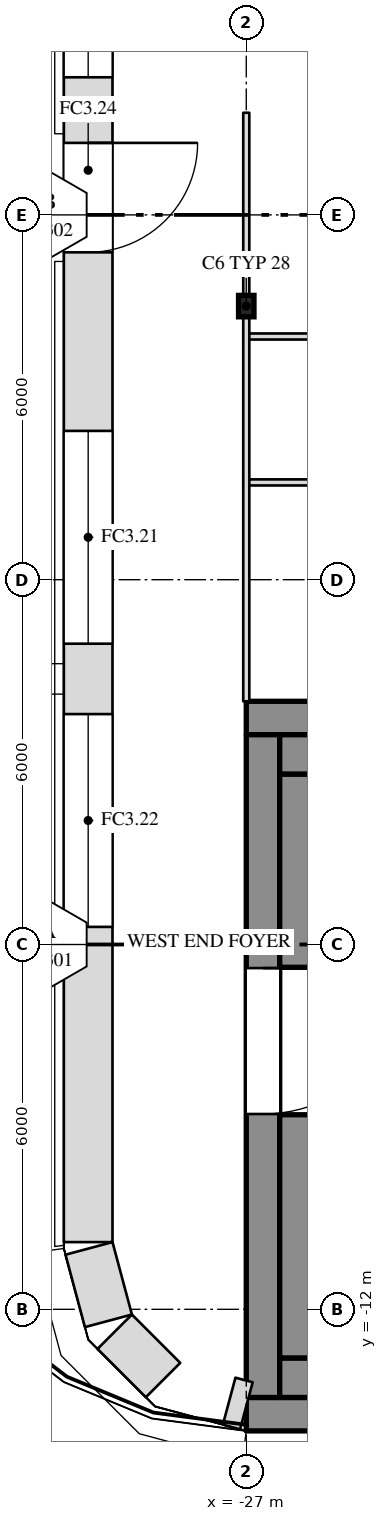
"""IFC4 building model, lengths in metres.
Left out: names, types, materials, properties, quantities, classifications, styles, units other than length and angle.
Written with IfcOpenShell. Run it as: python <this file> out.ifc"""

import sys

from ifc_helpers import new_model, si_unit, direction, frame, frame_2d, origin, origin_2d, place, context, subcontext, project, spatial, rectangle, i_section, extrude, element, fill, save


model = new_model("IFC4")
c1 = context("Model", 3, precision=1e-05, world=origin(), true_north=direction((0.0, 1.0)))
c2 = subcontext(c1, "Body", "Model", "MODEL_VIEW")
j1 = project(units=[si_unit("LENGTHUNIT", "METRE"), si_unit("PLANEANGLEUNIT", "RADIAN")], contexts=[c1])
p1 = place(None, origin())
s1 = spatial("IfcSite", under=j1, at=p1, CompositionType="ELEMENT")
p2 = place(p1, origin())
s2 = spatial("IfcBuilding", under=s1, at=p2, CompositionType="ELEMENT")
p3 = place(p2, frame((0.0, 0.0, 292.5)))
s3 = spatial("IfcBuildingStorey", under=s2, at=p3, CompositionType="ELEMENT", Elevation=292.5)
p4 = place(p3, frame((-27.0, 4.5, 0.0), z_axis=(0.0, 0.0, 1.0), x_axis=(1.0, 0.0, 0.0)))
e1 = element("IfcColumn", 1, at=p4, inside=s3, PredefinedType="COLUMN", context=c2, shape_type="SweptSolid", body=[
    extrude(i_section(OverallWidth=0.254, OverallDepth=0.353, WebThickness=0.01, FlangeThickness=0.016, at=origin_2d()), origin(), (0.0, 0.0, 1.0), 4.0),
])
p5 = place(p3, frame((-27.0, -2.275, 0.0), z_axis=(0.0, 0.0, 1.0), x_axis=(1.0, 0.0, 0.0)))
e2 = element("IfcWall", 2, at=p5, inside=s3, PredefinedType="SHEAR", context=c2, shape_type="SweptSolid", body=[
    extrude(rectangle(XDim=54.0, YDim=0.55, at=frame_2d((27.0, 0.0))), origin(), (0.0, 0.0, 1.0), 3.6),
])
p6 = place(p5, frame((15.15, 0.0, 0.0)))
e3 = element("IfcOpeningElement", 3, at=p6, cuts=e2, PredefinedType="OPENING", context=c2, shape_type="SweptSolid", body=[
    extrude(rectangle(XDim=2.4, YDim=2.1, at=frame_2d((1.2, 1.05))), frame((0.0, 0.287, 0.0), z_axis=(0.0, -1.0, 0.0), x_axis=(1.0, 0.0, 0.0)), (0.0, 0.0, 1.0), 0.574),
])
p7 = place(p5, frame((36.45, 0.0, 0.0)))
e4 = element("IfcOpeningElement", 4, at=p7, cuts=e2, PredefinedType="OPENING", context=c2, shape_type="SweptSolid", body=[
    extrude(rectangle(XDim=2.4, YDim=2.1, at=frame_2d((1.2, 1.05))), frame((0.0, 0.287, 0.0), z_axis=(0.0, -1.0, 0.0), x_axis=(1.0, 0.0, 0.0)), (0.0, 0.0, 1.0), 0.574),
])
p8 = place(p3, frame((-27.0, -13.725, 0.0), z_axis=(0.0, 0.0, 1.0), x_axis=(1.0, 0.0, 0.0)))
e5 = element("IfcWall", 5, at=p8, inside=s3, PredefinedType="SHEAR", context=c2, shape_type="SweptSolid", body=[
    extrude(rectangle(XDim=54.0, YDim=0.55, at=frame_2d((27.0, 0.0))), origin(), (0.0, 0.0, 1.0), 3.6),
])
p9 = place(p3, frame((-26.725, -13.45, 0.0), z_axis=(0.0, 0.0, 1.0), x_axis=(0.0, 1.0, 0.0)))
e6 = element("IfcWall", 6, at=p9, inside=s3, PredefinedType="SHEAR", context=c2, shape_type="SweptSolid", body=[
    extrude(rectangle(XDim=10.9, YDim=0.55, at=frame_2d((5.45, 0.0))), origin(), (0.0, 0.0, 1.0), 3.6),
])
p10 = place(p9, frame((4.662, 0.0, 0.0)))
e7 = element("IfcOpeningElement", 7, at=p10, cuts=e6, PredefinedType="OPENING", context=c2, shape_type="SweptSolid", body=[
    extrude(rectangle(XDim=2.4, YDim=2.1, at=frame_2d((1.2, 1.05))), frame((0.0, 0.287, 0.0), z_axis=(0.0, -1.0, 0.0), x_axis=(1.0, 0.0, 0.0)), (0.0, 0.0, 1.0), 0.574),
])
p11 = place(p3, frame((-26.45, -2.875, 0.0), z_axis=(0.0, 0.0, 1.0), x_axis=(1.0, 0.0, 0.0)))
e8 = element("IfcWall", 8, at=p11, inside=s3, PredefinedType="SHEAR", context=c2, shape_type="SweptSolid", body=[
    extrude(rectangle(XDim=14.45, YDim=0.65, at=frame_2d((7.225, 0.0))), origin(), (0.0, 0.0, 1.0), 3.6),
])
p12 = place(p3, frame((-26.45, -13.125, 0.0), z_axis=(0.0, 0.0, 1.0), x_axis=(1.0, 0.0, 0.0)))
e9 = element("IfcWall", 9, at=p12, inside=s3, PredefinedType="SHEAR", context=c2, shape_type="SweptSolid", body=[
    extrude(rectangle(XDim=52.9, YDim=0.65, at=frame_2d((26.45, 0.0))), origin(), (0.0, 0.0, 1.0), 3.6),
])
p13 = place(p3, frame((-26.125, -12.8, 0.0), z_axis=(0.0, 0.0, 1.0), x_axis=(0.0, 1.0, 0.0)))
e10 = element("IfcWall", 10, at=p13, inside=s3, PredefinedType="SHEAR", context=c2, shape_type="SweptSolid", body=[
    extrude(rectangle(XDim=4.0, YDim=0.65, at=frame_2d((2.0, 0.0))), origin(), (0.0, 0.0, 1.0), 3.6),
])
p14 = place(p3, frame((-26.125, -6.375, 0.0), z_axis=(0.0, 0.0, 1.0), x_axis=(0.0, 1.0, 0.0)))
e11 = element("IfcWall", 11, at=p14, inside=s3, PredefinedType="SHEAR", context=c2, shape_type="SweptSolid", body=[
    extrude(rectangle(XDim=3.175, YDim=0.65, at=frame_2d((1.587, 0.0))), origin(), (0.0, 0.0, 1.0), 3.6),
])
p15 = place(p3, frame((-27.0, -2.0, 0.0), z_axis=(0.0, 0.0, 1.0), x_axis=(0.0, 1.0, 0.0)))
e12 = element("IfcWall", 12, at=p15, inside=s3, PredefinedType="PARTITIONING", context=c2, shape_type="SweptSolid", body=[
    extrude(rectangle(XDim=6.323, YDim=0.1, at=frame_2d((3.162, 0.0))), origin(), (0.0, 0.0, 1.0), 2.668),
])
p16 = place(p3, frame((-27.0, 4.677, 0.0), z_axis=(0.0, 0.0, 1.0), x_axis=(0.0, 1.0, 0.0)))
e13 = element("IfcWall", 13, at=p16, inside=s3, PredefinedType="PARTITIONING", context=c2, shape_type="SweptSolid", body=[
    extrude(rectangle(XDim=3.003, YDim=0.1, at=frame_2d((1.502, 0.0))), origin(), (0.0, 0.0, 1.0), 2.668),
])
p17 = place(p3, frame((-26.95, 1.6, 0.0), z_axis=(0.0, 0.0, 1.0), x_axis=(1.0, 0.0, 0.0)))
e14 = element("IfcWall", 14, at=p17, inside=s3, PredefinedType="PARTITIONING", context=c2, shape_type="SweptSolid", body=[
    extrude(rectangle(XDim=13.4, YDim=0.1, at=frame_2d((6.7, 0.0))), origin(), (0.0, 0.0, 1.0), 3.6),
])
p18 = place(p17, frame((2.225, 0.0, 0.0)))
e15 = element("IfcOpeningElement", 15, at=p18, cuts=e14, PredefinedType="OPENING", context=c2, shape_type="SweptSolid", body=[
    extrude(rectangle(XDim=1.0, YDim=2.1, at=frame_2d((0.5, 1.05))), frame((0.0, 0.062, 0.0), z_axis=(0.0, -1.0, 0.0), x_axis=(1.0, 0.0, 0.0)), (0.0, 0.0, 1.0), 0.124),
])
p19 = place(p17, frame((7.775, 0.0, 0.0)))
e16 = element("IfcOpeningElement", 16, at=p19, cuts=e14, PredefinedType="OPENING", context=c2, shape_type="SweptSolid", body=[
    extrude(rectangle(XDim=1.0, YDim=2.1, at=frame_2d((0.5, 1.05))), frame((0.0, 0.062, 0.0), z_axis=(0.0, -1.0, 0.0), x_axis=(1.0, 0.0, 0.0)), (0.0, 0.0, 1.0), 0.124),
])
p20 = place(p17, frame((11.75, 0.0, 0.0)))
e17 = element("IfcOpeningElement", 17, at=p20, cuts=e14, PredefinedType="OPENING", context=c2, shape_type="SweptSolid", body=[
    extrude(rectangle(XDim=1.0, YDim=2.1, at=frame_2d((0.5, 1.05))), frame((0.0, 0.062, 0.0), z_axis=(0.0, -1.0, 0.0), x_axis=(1.0, 0.0, 0.0)), (0.0, 0.0, 1.0), 0.124),
])
p21 = place(p3, frame((-26.95, 4.0, 0.0), z_axis=(0.0, 0.0, 1.0), x_axis=(1.0, 0.0, 0.0)))
e18 = element("IfcWall", 18, at=p21, inside=s3, PredefinedType="PARTITIONING", context=c2, shape_type="SweptSolid", body=[
    extrude(rectangle(XDim=13.5, YDim=0.1, at=frame_2d((6.75, 0.0))), origin(), (0.0, 0.0, 1.0), 3.6),
])
p22 = place(p21, frame((6.2, 0.0, 0.0)))
e19 = element("IfcOpeningElement", 19, at=p22, cuts=e18, PredefinedType="OPENING", context=c2, shape_type="SweptSolid", body=[
    extrude(rectangle(XDim=1.0, YDim=2.1, at=frame_2d((0.5, 1.05))), frame((0.0, 0.062, 0.0), z_axis=(0.0, -1.0, 0.0), x_axis=(1.0, 0.0, 0.0)), (0.0, 0.0, 1.0), 0.124),
])
p23 = place(p3, frame((-29.6, 30.948, 0.0), z_axis=(0.0, 0.0, 1.0), x_axis=(0.0, -1.0, 0.0)))
e20 = element("IfcWall", 20, at=p23, inside=s3, PredefinedType="SOLIDWALL", context=c2, shape_type="SweptSolid", body=[
    extrude(rectangle(XDim=41.842, YDim=0.8, at=frame_2d((20.921, 0.0))), origin(), (0.0, 0.0, 1.0), 3.6),
])
p24 = place(p23, frame((5.211, 0.0, 1.0)))
e21 = element("IfcOpeningElement", 21, at=p24, cuts=e20, PredefinedType="OPENING", context=c2, shape_type="SweptSolid", body=[
    extrude(rectangle(XDim=3.5, YDim=2.3, at=frame_2d((1.75, 1.15))), frame((0.0, 0.412, 0.0), z_axis=(0.0, -1.0, 0.0), x_axis=(1.0, 0.0, 0.0)), (0.0, 0.0, 1.0), 0.824),
])
p25 = place(p23, frame((9.868, 0.0, 1.0)))
e22 = element("IfcOpeningElement", 22, at=p25, cuts=e20, PredefinedType="OPENING", context=c2, shape_type="SweptSolid", body=[
    extrude(rectangle(XDim=3.5, YDim=2.3, at=frame_2d((1.75, 1.15))), frame((0.0, 0.412, 0.0), z_axis=(0.0, -1.0, 0.0), x_axis=(1.0, 0.0, 0.0)), (0.0, 0.0, 1.0), 0.824),
])
p26 = place(p23, frame((14.527, 0.0, 1.0)))
e23 = element("IfcOpeningElement", 23, at=p26, cuts=e20, PredefinedType="OPENING", context=c2, shape_type="SweptSolid", body=[
    extrude(rectangle(XDim=3.5, YDim=2.3, at=frame_2d((1.75, 1.15))), frame((0.0, 0.412, 0.0), z_axis=(0.0, -1.0, 0.0), x_axis=(1.0, 0.0, 0.0)), (0.0, 0.0, 1.0), 0.824),
])
p27 = place(p23, frame((19.184, 0.0, 1.0)))
e24 = element("IfcOpeningElement", 24, at=p27, cuts=e20, PredefinedType="OPENING", context=c2, shape_type="SweptSolid", body=[
    extrude(rectangle(XDim=3.5, YDim=2.3, at=frame_2d((1.75, 1.15))), frame((0.0, 0.412, 0.0), z_axis=(0.0, -1.0, 0.0), x_axis=(1.0, 0.0, 0.0)), (0.0, 0.0, 1.0), 0.824),
])
p28 = place(p23, frame((28.5, 0.0, 1.0)))
e25 = element("IfcOpeningElement", 25, at=p28, cuts=e20, PredefinedType="OPENING", context=c2, shape_type="SweptSolid", body=[
    extrude(rectangle(XDim=3.5, YDim=2.3, at=frame_2d((1.75, 1.15))), frame((0.0, 0.412, 0.0), z_axis=(0.0, -1.0, 0.0), x_axis=(1.0, 0.0, 0.0)), (0.0, 0.0, 1.0), 0.824),
])
p29 = place(p23, frame((33.158, 0.0, 1.0)))
e26 = element("IfcOpeningElement", 26, at=p29, cuts=e20, PredefinedType="OPENING", context=c2, shape_type="SweptSolid", body=[
    extrude(rectangle(XDim=3.5, YDim=2.3, at=frame_2d((1.75, 1.15))), frame((0.0, 0.412, 0.0), z_axis=(0.0, -1.0, 0.0), x_axis=(1.0, 0.0, 0.0)), (0.0, 0.0, 1.0), 0.824),
])
p30 = place(p23, frame((23.763, 0.0, 0.0)))
e27 = element("IfcOpeningElement", 27, at=p30, cuts=e20, PredefinedType="OPENING", context=c2, shape_type="SweptSolid", body=[
    extrude(rectangle(XDim=1.8, YDim=2.4, at=frame_2d((0.9, 1.2))), frame((0.0, 0.412, 0.0), z_axis=(0.0, -1.0, 0.0), x_axis=(1.0, 0.0, 0.0)), (0.0, 0.0, 1.0), 0.824),
])
p31 = place(p3, frame((-29.586, -10.998, 0.0), z_axis=(0.0, 0.0, 1.0), x_axis=(0.258943885187, -0.965892366842, 0.0)))
e28 = element("IfcWall", 28, at=p31, inside=s3, PredefinedType="SOLIDWALL", context=c2, shape_type="SweptSolid", body=[
    extrude(rectangle(XDim=1.233, YDim=0.8, at=frame_2d((0.617, 0.0))), origin(), (0.0, 0.0, 1.0), 3.6),
])
p32 = place(p3, frame((-29.164, -12.369, 0.0), z_axis=(0.0, 0.0, 1.0), x_axis=(0.707106781187, -0.707106781187, 0.0)))
e29 = element("IfcWall", 29, at=p32, inside=s3, PredefinedType="SOLIDWALL", context=c2, shape_type="SweptSolid", body=[
    extrude(rectangle(XDim=1.125, YDim=0.8, at=frame_2d((0.562, 0.0))), origin(), (0.0, 0.0, 1.0), 3.6),
])
p33 = place(p3, frame((-27.281, -13.51, 0.0), z_axis=(0.0, 0.0, 1.0), x_axis=(0.965888567797, -0.258958055677, 0.0)))
e30 = element("IfcWall", 30, at=p33, inside=s3, PredefinedType="SOLIDWALL", context=c2, shape_type="SweptSolid", body=[
    extrude(rectangle(XDim=0.293, YDim=0.8, at=frame_2d((0.146, 0.0))), origin(), (0.0, 0.0, 1.0), 3.6),
])
p34 = place(p27, origin())
e31 = element("IfcWindow", 31, at=p34, inside=s3, PartitioningType="SINGLE_PANEL", PredefinedType="WINDOW", context=c2, shape_type="SweptSolid", body=[
    extrude(rectangle(XDim=3.5, YDim=2.3, at=frame_2d((1.75, 1.15))), frame((0.0, 0.03, 0.0), z_axis=(0.0, -1.0, 0.0), x_axis=(1.0, 0.0, 0.0)), (0.0, 0.0, 1.0), 0.06),
])
fill(e24, e31)
p35 = place(p28, origin())
e32 = element("IfcWindow", 32, at=p35, inside=s3, PartitioningType="SINGLE_PANEL", PredefinedType="WINDOW", context=c2, shape_type="SweptSolid", body=[
    extrude(rectangle(XDim=3.5, YDim=2.3, at=frame_2d((1.75, 1.15))), frame((0.0, 0.03, 0.0), z_axis=(0.0, -1.0, 0.0), x_axis=(1.0, 0.0, 0.0)), (0.0, 0.0, 1.0), 0.06),
])
fill(e25, e32)
p36 = place(p29, origin())
e33 = element("IfcWindow", 33, at=p36, inside=s3, PartitioningType="SINGLE_PANEL", PredefinedType="WINDOW", context=c2, shape_type="SweptSolid", body=[
    extrude(rectangle(XDim=3.5, YDim=2.3, at=frame_2d((1.75, 1.15))), frame((0.0, 0.03, 0.0), z_axis=(0.0, -1.0, 0.0), x_axis=(1.0, 0.0, 0.0)), (0.0, 0.0, 1.0), 0.06),
])
fill(e26, e33)
p37 = place(p30, origin())
e34 = element("IfcDoor", 34, at=p37, inside=s3, OperationType="DOUBLE_DOOR_SINGLE_SWING", PredefinedType="DOOR", context=c2, shape_type="SweptSolid", body=[
    extrude(rectangle(XDim=1.8, YDim=2.4, at=frame_2d((0.9, 1.2))), frame((0.0, 0.025, 0.0), z_axis=(0.0, -1.0, 0.0), x_axis=(1.0, 0.0, 0.0)), (0.0, 0.0, 1.0), 0.05),
])
fill(e27, e34)
p38 = place(p10, origin())
e35 = element("IfcDoor", 35, at=p38, inside=s3, OperationType="DOUBLE_DOOR_SINGLE_SWING", PredefinedType="DOOR", context=c2, shape_type="SweptSolid", body=[
    extrude(rectangle(XDim=2.4, YDim=2.1, at=frame_2d((1.2, 1.05))), frame((0.0, 0.025, 0.0), z_axis=(0.0, -1.0, 0.0), x_axis=(1.0, 0.0, 0.0)), (0.0, 0.0, 1.0), 0.05),
])
fill(e7, e35)
save(model, sys.argv[1])
